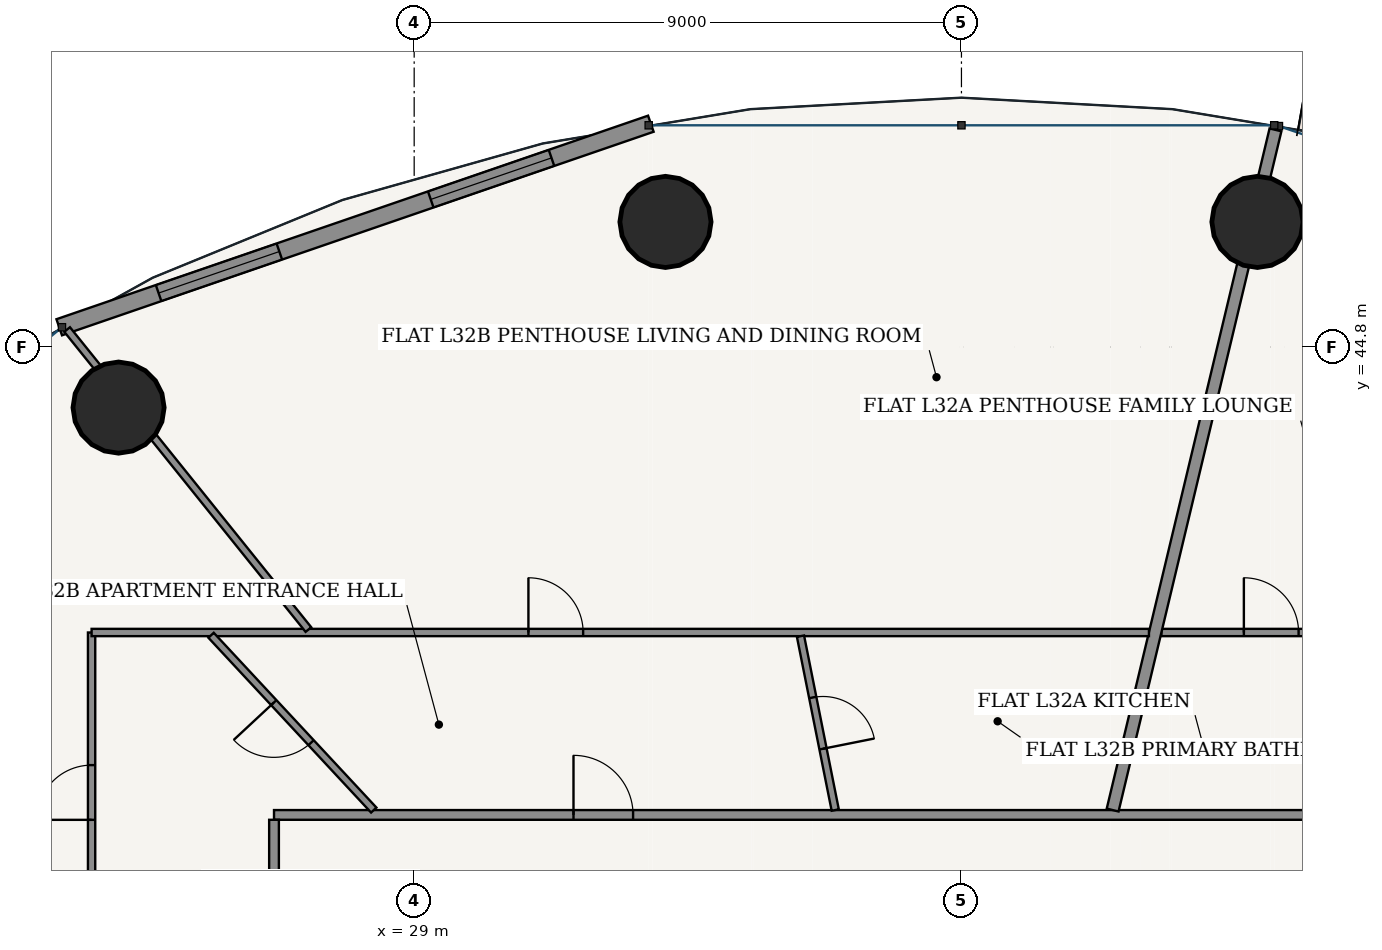
"""IFC4 building model, lengths in metres.
Left out: names, types, materials, properties, quantities, classifications, styles, units other than length and angle.
Written with IfcOpenShell. Run it as: python <this file> out.ifc"""

import sys

from ifc_helpers import new_model, si_unit, direction, frame, frame_2d, origin, origin_2d, place, context, subcontext, project, spatial, rectangle, hollow_circle, extrude, source, transform, mapped, element, fill, save


model = new_model("IFC4")
c1 = context("Model", 3, precision=1e-05, world=origin(), true_north=direction((-0.2419218956, 0.970295726276)))
c2 = subcontext(c1, "Body", "Model", "MODEL_VIEW")
j1 = project(units=[si_unit("LENGTHUNIT", "METRE"), si_unit("PLANEANGLEUNIT", "RADIAN")], contexts=[c1])
p1 = place(None, origin())
s1 = spatial("IfcSite", under=j1, at=p1, CompositionType="ELEMENT")
p2 = place(p1, origin())
s2 = spatial("IfcBuilding", under=s1, at=p2, CompositionType="ELEMENT")
p3 = place(p2, frame((0.0, 0.0, 123.0)))
s3 = spatial("IfcBuildingStorey", under=s2, at=p3, CompositionType="ELEMENT", Elevation=123.0)
for number, where, z_axis, x_axis in (
    (1, (42.867, 46.857, 0.0), (0.0, 0.0, 1.0), (1.0, 0.0, 0.0)),
    (2, (33.133, 46.857, 0.0), (0.0, 0.0, 1.0), (1.0, 0.0, 0.0)),
    (3, (24.138, 43.803, 0.0), (0.0, 0.0, 1.0), (1.0, 0.0, 0.0)),
):
    element("IfcColumn", number, at=place(p3, frame(where, z_axis=z_axis, x_axis=x_axis)), inside=s3, PredefinedType="COLUMN", context=c2, shape_type="SweptSolid", body=[
        extrude(hollow_circle(Radius=0.75, WallThickness=0.045, at=origin_2d()), origin(), (0.0, 0.0, 1.0), 3.6),
    ])
p4 = place(p3, frame((32.892, 48.472, 0.0), z_axis=(0.0, 0.0, 1.0), x_axis=(-0.945597432299, -0.325339047809, 0.0)))
e4 = element("IfcWall", 4, at=p4, inside=s3, PredefinedType="SOLIDWALL", context=c2, shape_type="SweptSolid", body=[
    extrude(rectangle(XDim=10.289, YDim=0.28, at=frame_2d((5.145, 0.0))), origin(), (0.0, 0.0, 1.0), 3.325),
])
p5 = place(p4, frame((1.728, 0.0, 0.85)))
e5 = element("IfcOpeningElement", 5, at=p5, cuts=e4, PredefinedType="OPENING", context=c2, shape_type="SweptSolid", body=[
    extrude(rectangle(XDim=2.1, YDim=1.95, at=frame_2d((1.05, 0.975))), frame((0.0, 0.15, 0.0), z_axis=(0.0, -1.0, 0.0), x_axis=(1.0, 0.0, 0.0)), (0.0, 0.0, 1.0), 0.3),
])
p6 = place(p4, frame((6.461, 0.0, 0.85)))
e6 = element("IfcOpeningElement", 6, at=p6, cuts=e4, PredefinedType="OPENING", context=c2, shape_type="SweptSolid", body=[
    extrude(rectangle(XDim=2.1, YDim=1.95, at=frame_2d((1.05, 0.975))), frame((0.0, 0.15, 0.0), z_axis=(0.0, -1.0, 0.0), x_axis=(1.0, 0.0, 0.0)), (0.0, 0.0, 1.0), 0.3),
])
p7 = place(p3, frame((26.695, 37.105, 0.0), z_axis=(0.0, 0.0, 1.0), x_axis=(1.0, 0.0, 0.0)))
e7 = element("IfcWall", 7, at=p7, inside=s3, PredefinedType="PARTITIONING", context=c2, shape_type="SweptSolid", body=[
    extrude(rectangle(XDim=22.61, YDim=0.16, at=frame_2d((11.305, 0.0))), origin(), (0.0, 0.0, 1.0), 2.767),
])
p8 = place(p7, frame((4.925, 0.0, 0.0)))
e8 = element("IfcOpeningElement", 8, at=p8, cuts=e7, PredefinedType="OPENING", context=c2, shape_type="SweptSolid", body=[
    extrude(rectangle(XDim=0.98, YDim=2.2, at=frame_2d((0.49, 1.1))), frame((0.0, 0.09, 0.0), z_axis=(0.0, -1.0, 0.0), x_axis=(1.0, 0.0, 0.0)), (0.0, 0.0, 1.0), 0.18),
])
p9 = place(p3, frame((26.695, 16.575, 0.0), z_axis=(0.0, 0.0, 1.0), x_axis=(0.0, 1.0, 0.0)))
e9 = element("IfcWall", 9, at=p9, inside=s3, PredefinedType="PARTITIONING", context=c2, shape_type="SweptSolid", body=[
    extrude(rectangle(XDim=20.45, YDim=0.16, at=frame_2d((10.225, 0.0))), origin(), (0.0, 0.0, 1.0), 2.767),
])
p10 = place(p9, frame((9.547, 0.0, 0.0)))
e10 = element("IfcOpeningElement", 10, at=p10, cuts=e9, PredefinedType="OPENING", context=c2, shape_type="SweptSolid", body=[
    extrude(rectangle(XDim=0.98, YDim=2.2, at=frame_2d((0.49, 1.1))), frame((0.0, 0.09, 0.0), z_axis=(0.0, -1.0, 0.0), x_axis=(1.0, 0.0, 0.0)), (0.0, 0.0, 1.0), 0.18),
])
p11 = place(p3, frame((41.287, 40.105, 0.0), z_axis=(0.0, 0.0, 1.0), x_axis=(1.0, 0.0, 0.0)))
e11 = element("IfcWall", 11, at=p11, inside=s3, PredefinedType="PARTITIONING", context=c2, shape_type="SweptSolid", body=[
    extrude(rectangle(XDim=11.018, YDim=0.12, at=frame_2d((5.509, 0.0))), origin(), (0.0, 0.0, 1.0), 2.767),
])
p12 = place(p11, frame((1.357, 0.0, 0.0)))
e12 = element("IfcOpeningElement", 12, at=p12, cuts=e11, PredefinedType="OPENING", context=c2, shape_type="SweptSolid", body=[
    extrude(rectangle(XDim=0.9, YDim=2.15, at=frame_2d((0.45, 1.075))), frame((0.0, 0.07, 0.0), z_axis=(0.0, -1.0, 0.0), x_axis=(1.0, 0.0, 0.0)), (0.0, 0.0, 1.0), 0.14),
])
p13 = place(p3, frame((40.486, 37.185, 0.0), z_axis=(0.0, 0.0, 1.0), x_axis=(0.232834224261, 0.972516438942, 0.0)))
e13 = element("IfcWall", 13, at=p13, inside=s3, PredefinedType="PARTITIONING", context=c2, shape_type="SweptSolid", body=[
    extrude(rectangle(XDim=11.502, YDim=0.2, at=frame_2d((5.751, 0.0))), origin(), (0.0, 0.0, 1.0), 2.767),
])
p14 = place(p3, frame((23.695, 34.843, 0.0), z_axis=(0.0, 0.0, 1.0), x_axis=(0.0, 1.0, 0.0)))
e14 = element("IfcWall", 14, at=p14, inside=s3, PredefinedType="PARTITIONING", context=c2, shape_type="SweptSolid", body=[
    extrude(rectangle(XDim=5.262, YDim=0.12, at=frame_2d((2.631, 0.0))), origin(), (0.0, 0.0, 1.0), 3.004),
])
p15 = place(p14, frame((2.181, 0.0, 0.0)))
e15 = element("IfcOpeningElement", 15, at=p15, cuts=e14, PredefinedType="OPENING", context=c2, shape_type="SweptSolid", body=[
    extrude(rectangle(XDim=0.9, YDim=2.15, at=frame_2d((0.45, 1.075))), frame((0.0, 0.07, 0.0), z_axis=(0.0, -1.0, 0.0), x_axis=(1.0, 0.0, 0.0)), (0.0, 0.0, 1.0), 0.14),
])
p16 = place(p3, frame((23.695, 40.105, 0.0), z_axis=(0.0, 0.0, 1.0), x_axis=(1.0, 0.0, 0.0)))
e16 = element("IfcWall", 16, at=p16, inside=s3, PredefinedType="PARTITIONING", context=c2, shape_type="SweptSolid", body=[
    extrude(rectangle(XDim=17.388, YDim=0.12, at=frame_2d((8.694, 0.0))), origin(), (0.0, 0.0, 1.0), 2.767),
])
p17 = place(p16, frame((7.184, 0.0, 0.0)))
e17 = element("IfcOpeningElement", 17, at=p17, cuts=e16, PredefinedType="OPENING", context=c2, shape_type="SweptSolid", body=[
    extrude(rectangle(XDim=0.9, YDim=2.15, at=frame_2d((0.45, 1.075))), frame((0.0, 0.07, 0.0), z_axis=(0.0, -1.0, 0.0), x_axis=(1.0, 0.0, 0.0)), (0.0, 0.0, 1.0), 0.14),
])
p18 = place(p3, frame((27.261, 40.153, 0.0), z_axis=(0.0, 0.0, 1.0), x_axis=(-0.626714875168, 0.779248654309, 0.0)))
e18 = element("IfcWall", 18, at=p18, inside=s3, PredefinedType="PARTITIONING", context=c2, shape_type="SweptSolid", body=[
    extrude(rectangle(XDim=6.332, YDim=0.12, at=frame_2d((3.166, 0.0))), origin(), (0.0, 0.0, 1.0), 2.767),
])
p19 = place(p3, frame((35.925, 37.185, 0.0), z_axis=(0.0, 0.0, 1.0), x_axis=(-0.196019518907, 0.980599993987, 0.0)))
e19 = element("IfcWall", 19, at=p19, inside=s3, PredefinedType="PARTITIONING", context=c2, shape_type="SweptSolid", body=[
    extrude(rectangle(XDim=2.916, YDim=0.12, at=frame_2d((1.458, 0.0))), origin(), (0.0, 0.0, 1.0), 3.325),
])
p20 = place(p19, frame((1.028, 0.0, 0.0)))
e20 = element("IfcOpeningElement", 20, at=p20, cuts=e19, PredefinedType="OPENING", context=c2, shape_type="SweptSolid", body=[
    extrude(rectangle(XDim=0.86, YDim=2.15, at=frame_2d((0.43, 1.075))), frame((0.0, 0.07, 0.0), z_axis=(0.0, -1.0, 0.0), x_axis=(1.0, 0.0, 0.0)), (0.0, 0.0, 1.0), 0.14),
])
p21 = place(p3, frame((28.335, 37.185, 0.0), z_axis=(0.0, 0.0, 1.0), x_axis=(-0.681251984121, 0.732048997083, 0.0)))
e21 = element("IfcWall", 21, at=p21, inside=s3, PredefinedType="PARTITIONING", context=c2, shape_type="SweptSolid", body=[
    extrude(rectangle(XDim=3.927, YDim=0.12, at=frame_2d((1.963, 0.0))), origin(), (0.0, 0.0, 1.0), 2.767),
])
p22 = place(p21, frame((1.513, 0.0, 0.0)))
e22 = element("IfcOpeningElement", 22, at=p22, cuts=e21, PredefinedType="OPENING", context=c2, shape_type="SweptSolid", body=[
    extrude(rectangle(XDim=0.9, YDim=2.15, at=frame_2d((0.45, 1.075))), frame((0.0, 0.07, 0.0), z_axis=(0.0, -1.0, 0.0), x_axis=(1.0, 0.0, 0.0)), (0.0, 0.0, 1.0), 0.14),
])
p23 = place(p3, frame((26.615, 33.12, 0.0), z_axis=(0.0, 0.0, 1.0), x_axis=(-0.874319192772, 0.485351366692, 0.0)))
e23 = element("IfcWall", 23, at=p23, inside=s3, PredefinedType="PARTITIONING", context=c2, shape_type="SweptSolid", body=[
    extrude(rectangle(XDim=12.158, YDim=0.2, at=frame_2d((6.079, 0.0))), origin(), (0.0, 0.0, 1.0), 2.767),
])
m1 = source(origin(), c2, "Body", "SweptSolid", [
    extrude(rectangle(XDim=2.1, YDim=1.95, at=frame_2d((1.05, 0.975))), frame((0.0, 0.03, 0.0), z_axis=(0.0, -1.0, 0.0), x_axis=(1.0, 0.0, 0.0)), (0.0, 0.0, 1.0), 0.06),
])
p24 = place(p5, origin())
e24 = element("IfcWindow", 24, at=p24, inside=s3, PartitioningType="SINGLE_PANEL", PredefinedType="WINDOW", context=c2, shape_type="MappedRepresentation", body=[
    mapped(m1, transform((0.0, 0.0, 0.0), scale=1.0)),
])
fill(e5, e24)
p25 = place(p6, origin())
e25 = element("IfcWindow", 25, at=p25, inside=s3, PartitioningType="SINGLE_PANEL", PredefinedType="WINDOW", context=c2, shape_type="MappedRepresentation", body=[
    mapped(m1, transform((0.0, 0.0, 0.0), scale=1.0)),
])
fill(e6, e25)
m2 = source(origin(), c2, "Body", "SweptSolid", [
    extrude(rectangle(XDim=0.9, YDim=2.15, at=frame_2d((0.45, 1.075))), frame((0.0, 0.025, 0.0), z_axis=(0.0, -1.0, 0.0), x_axis=(1.0, 0.0, 0.0)), (0.0, 0.0, 1.0), 0.05),
])
p26 = place(p12, origin())
e26 = element("IfcDoor", 26, at=p26, inside=s3, OperationType="SINGLE_SWING_LEFT", PredefinedType="DOOR", context=c2, shape_type="MappedRepresentation", body=[
    mapped(m2, transform((0.0, 0.0, 0.0), scale=1.0)),
])
fill(e12, e26)
m3 = source(origin(), c2, "Body", "SweptSolid", [
    extrude(rectangle(XDim=0.98, YDim=2.2, at=frame_2d((0.49, 1.1))), frame((0.0, 0.025, 0.0), z_axis=(0.0, -1.0, 0.0), x_axis=(1.0, 0.0, 0.0)), (0.0, 0.0, 1.0), 0.05),
])
p27 = place(p8, origin())
e27 = element("IfcDoor", 27, at=p27, inside=s3, OperationType="SINGLE_SWING_LEFT", PredefinedType="DOOR", context=c2, shape_type="MappedRepresentation", body=[
    mapped(m3, transform((0.0, 0.0, 0.0), scale=1.0)),
])
fill(e8, e27)
m4 = source(origin(), c2, "Body", "SweptSolid", [
    extrude(rectangle(XDim=0.86, YDim=2.15, at=frame_2d((0.43, 1.075))), frame((0.0, 0.025, 0.0), z_axis=(0.0, -1.0, 0.0), x_axis=(1.0, 0.0, 0.0)), (0.0, 0.0, 1.0), 0.05),
])
p28 = place(p20, frame((0.86, 0.0, 0.0), z_axis=(0.0, 0.0, 1.0), x_axis=(-1.0, 0.0, 0.0)))
e28 = element("IfcDoor", 28, at=p28, inside=s3, OperationType="SINGLE_SWING_RIGHT", PredefinedType="DOOR", context=c2, shape_type="MappedRepresentation", body=[
    mapped(m4, transform((0.0, 0.0, 0.0), scale=1.0)),
])
fill(e20, e28)
p29 = place(p17, origin())
e29 = element("IfcDoor", 29, at=p29, inside=s3, OperationType="SINGLE_SWING_LEFT", PredefinedType="DOOR", context=c2, shape_type="MappedRepresentation", body=[
    mapped(m2, transform((0.0, 0.0, 0.0), scale=1.0)),
])
fill(e17, e29)
p30 = place(p22, origin())
e30 = element("IfcDoor", 30, at=p30, inside=s3, OperationType="SINGLE_SWING_RIGHT", PredefinedType="DOOR", context=c2, shape_type="MappedRepresentation", body=[
    mapped(m2, transform((0.0, 0.0, 0.0), scale=1.0)),
])
fill(e22, e30)
p31 = place(p15, origin())
e31 = element("IfcDoor", 31, at=p31, inside=s3, OperationType="SINGLE_SWING_LEFT", PredefinedType="DOOR", context=c2, shape_type="MappedRepresentation", body=[
    mapped(m2, transform((0.0, 0.0, 0.0), scale=1.0)),
])
fill(e15, e31)
save(model, sys.argv[1])
